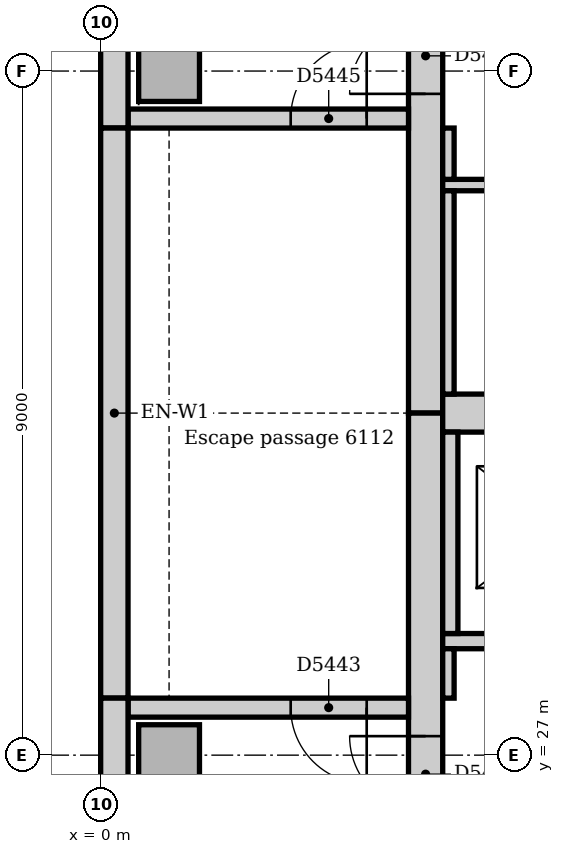
"""IFC4 building model, lengths in metres.
Left out: names, types, materials, properties, quantities, classifications, styles, units other than length and angle.
Written with IfcOpenShell. Run it as: python <this file> out.ifc"""

import sys

from ifc_helpers import new_model, si_unit, direction, frame, frame_2d, origin, origin_2d, place, context, subcontext, project, spatial, rectangle, extrude, element, fill, save


model = new_model("IFC4")
c1 = context("Model", 3, precision=1e-05, world=origin(), true_north=direction((0.0, 1.0)))
c2 = subcontext(c1, "Body", "Model", "MODEL_VIEW")
j1 = project(units=[si_unit("LENGTHUNIT", "METRE"), si_unit("PLANEANGLEUNIT", "RADIAN")], contexts=[c1])
p1 = place(None, origin())
s1 = spatial("IfcSite", under=j1, at=p1, CompositionType="ELEMENT")
p2 = place(p1, origin())
s2 = spatial("IfcBuilding", under=s1, at=p2, CompositionType="ELEMENT")
p3 = place(p2, frame((0.0, 0.0, 255.0)))
s3 = spatial("IfcBuildingStorey", under=s2, at=p3, CompositionType="ELEMENT", Elevation=255.0)
p4 = place(p3, frame((4.275, 42.0, 0.0), z_axis=(0.0, 0.0, 1.0), x_axis=(0.0, -1.0, 0.0)))
e1 = element("IfcWall", 1, at=p4, inside=s3, PredefinedType="SOLIDWALL", context=c2, shape_type="SweptSolid", body=[
    extrude(rectangle(XDim=10.5, YDim=0.45, at=frame_2d((5.25, 0.0))), origin(), (0.0, 0.0, 1.0), 4.0),
])
p5 = place(p4, frame((5.3, 0.0, 0.0)))
e2 = element("IfcOpeningElement", 2, at=p5, cuts=e1, PredefinedType="OPENING", context=c2, shape_type="SweptSolid", body=[
    extrude(rectangle(XDim=1.0, YDim=2.1, at=frame_2d((0.5, 1.05))), frame((0.0, 0.235, 0.0), z_axis=(0.0, -1.0, 0.0), x_axis=(1.0, 0.0, 0.0)), (0.0, 0.0, 1.0), 0.47),
])
p6 = place(p3, frame((4.275, 31.5, 0.0), z_axis=(0.0, 0.0, 1.0), x_axis=(0.0, -1.0, 0.0)))
e3 = element("IfcWall", 3, at=p6, inside=s3, PredefinedType="SOLIDWALL", context=c2, shape_type="SweptSolid", body=[
    extrude(rectangle(XDim=10.5, YDim=0.45, at=frame_2d((5.25, 0.0))), origin(), (0.0, 0.0, 1.0), 4.0),
])
p7 = place(p6, frame((4.25, 0.0, 0.0)))
e4 = element("IfcOpeningElement", 4, at=p7, cuts=e3, PredefinedType="OPENING", context=c2, shape_type="SweptSolid", body=[
    extrude(rectangle(XDim=1.0, YDim=2.1, at=frame_2d((0.5, 1.05))), frame((0.0, 0.235, 0.0), z_axis=(0.0, -1.0, 0.0), x_axis=(1.0, 0.0, 0.0)), (0.0, 0.0, 1.0), 0.47),
])
p8 = place(p3, frame((4.5, 31.5, 0.0), z_axis=(0.0, 0.0, 1.0), x_axis=(1.0, 0.0, 0.0)))
e5 = element("IfcWall", 5, at=p8, inside=s3, PredefinedType="SOLIDWALL", context=c2, shape_type="SweptSolid", body=[
    extrude(rectangle(XDim=18.0, YDim=0.5, at=frame_2d((9.0, 0.0))), origin(), (0.0, 0.0, 1.0), 4.0),
])
p9 = place(p3, frame((4.05, 27.625, 0.0), z_axis=(0.0, 0.0, 1.0), x_axis=(-1.0, 0.0, 0.0)))
e6 = element("IfcWall", 6, at=p9, inside=s3, PredefinedType="SOLIDWALL", context=c2, shape_type="SweptSolid", body=[
    extrude(rectangle(XDim=3.69, YDim=0.25, at=frame_2d((1.845, 0.0))), origin(), (0.0, 0.0, 1.0), 4.0),
])
p10 = place(p9, frame((0.55, 0.0, 0.0)))
e7 = element("IfcOpeningElement", 7, at=p10, cuts=e6, PredefinedType="OPENING", context=c2, shape_type="SweptSolid", body=[
    extrude(rectangle(XDim=1.0, YDim=2.1, at=frame_2d((0.5, 1.05))), frame((0.0, 0.135, 0.0), z_axis=(0.0, -1.0, 0.0), x_axis=(1.0, 0.0, 0.0)), (0.0, 0.0, 1.0), 0.27),
])
p11 = place(p3, frame((0.36, 35.375, 0.0), z_axis=(0.0, 0.0, 1.0), x_axis=(1.0, 0.0, 0.0)))
e8 = element("IfcWall", 8, at=p11, inside=s3, PredefinedType="SOLIDWALL", context=c2, shape_type="SweptSolid", body=[
    extrude(rectangle(XDim=3.69, YDim=0.25, at=frame_2d((1.845, 0.0))), origin(), (0.0, 0.0, 1.0), 4.0),
])
p12 = place(p11, frame((2.14, 0.0, 0.0)))
e9 = element("IfcOpeningElement", 9, at=p12, cuts=e8, PredefinedType="OPENING", context=c2, shape_type="SweptSolid", body=[
    extrude(rectangle(XDim=1.0, YDim=2.1, at=frame_2d((0.5, 1.05))), frame((0.0, 0.135, 0.0), z_axis=(0.0, -1.0, 0.0), x_axis=(1.0, 0.0, 0.0)), (0.0, 0.0, 1.0), 0.27),
])
for number, where, z_axis, x_axis in (
    (10, (0.9, 27.0, 0.0), (0.0, 0.0, 1.0), (1.0, 0.0, 0.0)),
    (11, (0.9, 36.0, 0.0), (0.0, 0.0, 1.0), (1.0, 0.0, 0.0)),
):
    element("IfcColumn", number, at=place(p3, frame(where, z_axis=z_axis, x_axis=x_axis)), inside=s3, PredefinedType="COLUMN", context=c2, shape_type="SweptSolid", body=[
        extrude(rectangle(XDim=0.8, YDim=0.8, at=origin_2d()), origin(), (0.0, 0.0, 1.0), 4.0),
    ])
p13 = place(p3, frame((0.18, 42.0, 0.0), z_axis=(0.0, 0.0, 1.0), x_axis=(0.0, -1.0, 0.0)))
e12 = element("IfcWall", 12, at=p13, inside=s3, PredefinedType="STANDARD", context=c2, shape_type="SweptSolid", body=[
    extrude(rectangle(XDim=6.75, YDim=0.36, at=frame_2d((3.375, 0.0))), origin(), (0.0, 0.0, 1.0), 3.85),
])
p14 = place(p3, frame((0.18, 35.25, 0.0), z_axis=(0.0, 0.0, 1.0), x_axis=(0.0, -1.0, 0.0)))
e13 = element("IfcWall", 13, at=p14, inside=s3, PredefinedType="STANDARD", context=c2, shape_type="SweptSolid", body=[
    extrude(rectangle(XDim=7.5, YDim=0.36, at=frame_2d((3.75, 0.0))), origin(), (0.0, 0.0, 1.0), 3.85),
])
p15 = place(p3, frame((0.18, 27.75, 0.0), z_axis=(0.0, 0.0, 1.0), x_axis=(0.0, -1.0, 0.0)))
e14 = element("IfcWall", 14, at=p15, inside=s3, PredefinedType="STANDARD", context=c2, shape_type="SweptSolid", body=[
    extrude(rectangle(XDim=5.507, YDim=0.36, at=frame_2d((2.754, 0.0))), origin(), (0.0, 0.0, 1.0), 3.85),
])
p16 = place(p3, frame((4.5, 28.5, 0.0), z_axis=(0.0, 0.0, 1.0), x_axis=(1.0, 0.0, 0.0)))
e15 = element("IfcWall", 15, at=p16, inside=s3, PredefinedType="PARTITIONING", context=c2, shape_type="SweptSolid", body=[
    extrude(rectangle(XDim=18.0, YDim=0.2, at=frame_2d((9.0, 0.0))), origin(), (0.0, 0.0, 1.0), 3.85),
])
p17 = place(p16, frame((0.95, 0.0, 0.0)))
e16 = element("IfcOpeningElement", 16, at=p17, cuts=e15, PredefinedType="OPENING", context=c2, shape_type="SweptSolid", body=[
    extrude(rectangle(XDim=1.1, YDim=2.1, at=frame_2d((0.55, 1.05))), frame((0.0, 0.11, 0.0), z_axis=(0.0, -1.0, 0.0), x_axis=(1.0, 0.0, 0.0)), (0.0, 0.0, 1.0), 0.22),
])
p18 = place(p16, frame((3.95, 0.0, 0.0)))
e17 = element("IfcOpeningElement", 17, at=p18, cuts=e15, PredefinedType="OPENING", context=c2, shape_type="SweptSolid", body=[
    extrude(rectangle(XDim=1.1, YDim=2.1, at=frame_2d((0.55, 1.05))), frame((0.0, 0.11, 0.0), z_axis=(0.0, -1.0, 0.0), x_axis=(1.0, 0.0, 0.0)), (0.0, 0.0, 1.0), 0.22),
])
p19 = place(p16, frame((6.95, 0.0, 0.0)))
e18 = element("IfcOpeningElement", 18, at=p19, cuts=e15, PredefinedType="OPENING", context=c2, shape_type="SweptSolid", body=[
    extrude(rectangle(XDim=1.1, YDim=2.1, at=frame_2d((0.55, 1.05))), frame((0.0, 0.11, 0.0), z_axis=(0.0, -1.0, 0.0), x_axis=(1.0, 0.0, 0.0)), (0.0, 0.0, 1.0), 0.22),
])
p20 = place(p16, frame((9.95, 0.0, 0.0)))
e19 = element("IfcOpeningElement", 19, at=p20, cuts=e15, PredefinedType="OPENING", context=c2, shape_type="SweptSolid", body=[
    extrude(rectangle(XDim=1.1, YDim=2.1, at=frame_2d((0.55, 1.05))), frame((0.0, 0.11, 0.0), z_axis=(0.0, -1.0, 0.0), x_axis=(1.0, 0.0, 0.0)), (0.0, 0.0, 1.0), 0.22),
])
p21 = place(p16, frame((12.95, 0.0, 0.0)))
e20 = element("IfcOpeningElement", 20, at=p21, cuts=e15, PredefinedType="OPENING", context=c2, shape_type="SweptSolid", body=[
    extrude(rectangle(XDim=1.1, YDim=2.1, at=frame_2d((0.55, 1.05))), frame((0.0, 0.11, 0.0), z_axis=(0.0, -1.0, 0.0), x_axis=(1.0, 0.0, 0.0)), (0.0, 0.0, 1.0), 0.22),
])
p22 = place(p16, frame((15.95, 0.0, 0.0)))
e21 = element("IfcOpeningElement", 21, at=p22, cuts=e15, PredefinedType="OPENING", context=c2, shape_type="SweptSolid", body=[
    extrude(rectangle(XDim=1.1, YDim=2.1, at=frame_2d((0.55, 1.05))), frame((0.0, 0.11, 0.0), z_axis=(0.0, -1.0, 0.0), x_axis=(1.0, 0.0, 0.0)), (0.0, 0.0, 1.0), 0.22),
])
p23 = place(p3, frame((4.6, 28.6, 0.0), z_axis=(0.0, 0.0, 1.0), x_axis=(0.0, 1.0, 0.0)))
e22 = element("IfcWall", 22, at=p23, inside=s3, PredefinedType="PARTITIONING", context=c2, shape_type="SweptSolid", body=[
    extrude(rectangle(XDim=2.65, YDim=0.2, at=frame_2d((1.325, 0.0))), origin(), (0.0, 0.0, 1.0), 3.85),
])
p24 = place(p3, frame((4.5, 34.5, 0.0), z_axis=(0.0, 0.0, 1.0), x_axis=(1.0, 0.0, 0.0)))
e23 = element("IfcWall", 23, at=p24, inside=s3, PredefinedType="PARTITIONING", context=c2, shape_type="SweptSolid", body=[
    extrude(rectangle(XDim=5.9, YDim=0.15, at=frame_2d((2.95, 0.0))), origin(), (0.0, 0.0, 1.0), 3.85),
])
p25 = place(p24, frame((2.5, 0.0, 0.0)))
e24 = element("IfcOpeningElement", 24, at=p25, cuts=e23, PredefinedType="OPENING", context=c2, shape_type="SweptSolid", body=[
    extrude(rectangle(XDim=0.9, YDim=2.1, at=frame_2d((0.45, 1.05))), frame((0.0, 0.085, 0.0), z_axis=(0.0, -1.0, 0.0), x_axis=(1.0, 0.0, 0.0)), (0.0, 0.0, 1.0), 0.17),
])
p26 = place(p3, frame((4.575, 34.575, 0.0), z_axis=(0.0, 0.0, 1.0), x_axis=(0.0, 1.0, 0.0)))
e25 = element("IfcWall", 25, at=p26, inside=s3, PredefinedType="PARTITIONING", context=c2, shape_type="SweptSolid", body=[
    extrude(rectangle(XDim=0.675, YDim=0.15, at=frame_2d((0.338, 0.0))), origin(), (0.0, 0.0, 1.0), 3.85),
])
p27 = place(p3, frame((4.575, 31.75, 0.0), z_axis=(0.0, 0.0, 1.0), x_axis=(0.0, 1.0, 0.0)))
e26 = element("IfcWall", 26, at=p27, inside=s3, PredefinedType="PARTITIONING", context=c2, shape_type="SweptSolid", body=[
    extrude(rectangle(XDim=2.675, YDim=0.15, at=frame_2d((1.337, 0.0))), origin(), (0.0, 0.0, 1.0), 3.85),
])
p28 = place(p3, frame((4.575, 27.75, 0.0), z_axis=(0.0, 0.0, 1.0), x_axis=(0.0, 1.0, 0.0)))
e27 = element("IfcWall", 27, at=p28, inside=s3, PredefinedType="PARTITIONING", context=c2, shape_type="SweptSolid", body=[
    extrude(rectangle(XDim=0.65, YDim=0.15, at=frame_2d((0.325, 0.0))), origin(), (0.0, 0.0, 1.0), 3.85),
])
p29 = place(p7, frame((1.0, 0.0, 0.0), z_axis=(0.0, 0.0, 1.0), x_axis=(-1.0, 0.0, 0.0)))
e28 = element("IfcDoor", 28, at=p29, inside=s3, OperationType="SINGLE_SWING_RIGHT", PredefinedType="DOOR", context=c2, shape_type="SweptSolid", body=[
    extrude(rectangle(XDim=1.0, YDim=2.1, at=frame_2d((0.5, 1.05))), frame((0.0, 0.025, 0.0), z_axis=(0.0, -1.0, 0.0), x_axis=(1.0, 0.0, 0.0)), (0.0, 0.0, 1.0), 0.05),
])
fill(e4, e28)
p30 = place(p10, origin())
e29 = element("IfcDoor", 29, at=p30, inside=s3, OperationType="SINGLE_SWING_LEFT", PredefinedType="DOOR", context=c2, shape_type="SweptSolid", body=[
    extrude(rectangle(XDim=1.0, YDim=2.1, at=frame_2d((0.5, 1.05))), frame((0.0, 0.025, 0.0), z_axis=(0.0, -1.0, 0.0), x_axis=(1.0, 0.0, 0.0)), (0.0, 0.0, 1.0), 0.05),
])
fill(e7, e29)
p31 = place(p5, frame((1.0, 0.0, 0.0), z_axis=(0.0, 0.0, 1.0), x_axis=(-1.0, 0.0, 0.0)))
e30 = element("IfcDoor", 30, at=p31, inside=s3, OperationType="SINGLE_SWING_LEFT", PredefinedType="DOOR", context=c2, shape_type="SweptSolid", body=[
    extrude(rectangle(XDim=1.0, YDim=2.1, at=frame_2d((0.5, 1.05))), frame((0.0, 0.025, 0.0), z_axis=(0.0, -1.0, 0.0), x_axis=(1.0, 0.0, 0.0)), (0.0, 0.0, 1.0), 0.05),
])
fill(e2, e30)
p32 = place(p12, origin())
e31 = element("IfcDoor", 31, at=p32, inside=s3, OperationType="SINGLE_SWING_RIGHT", PredefinedType="DOOR", context=c2, shape_type="SweptSolid", body=[
    extrude(rectangle(XDim=1.0, YDim=2.1, at=frame_2d((0.5, 1.05))), frame((0.0, 0.025, 0.0), z_axis=(0.0, -1.0, 0.0), x_axis=(1.0, 0.0, 0.0)), (0.0, 0.0, 1.0), 0.05),
])
fill(e9, e31)
save(model, sys.argv[1])
